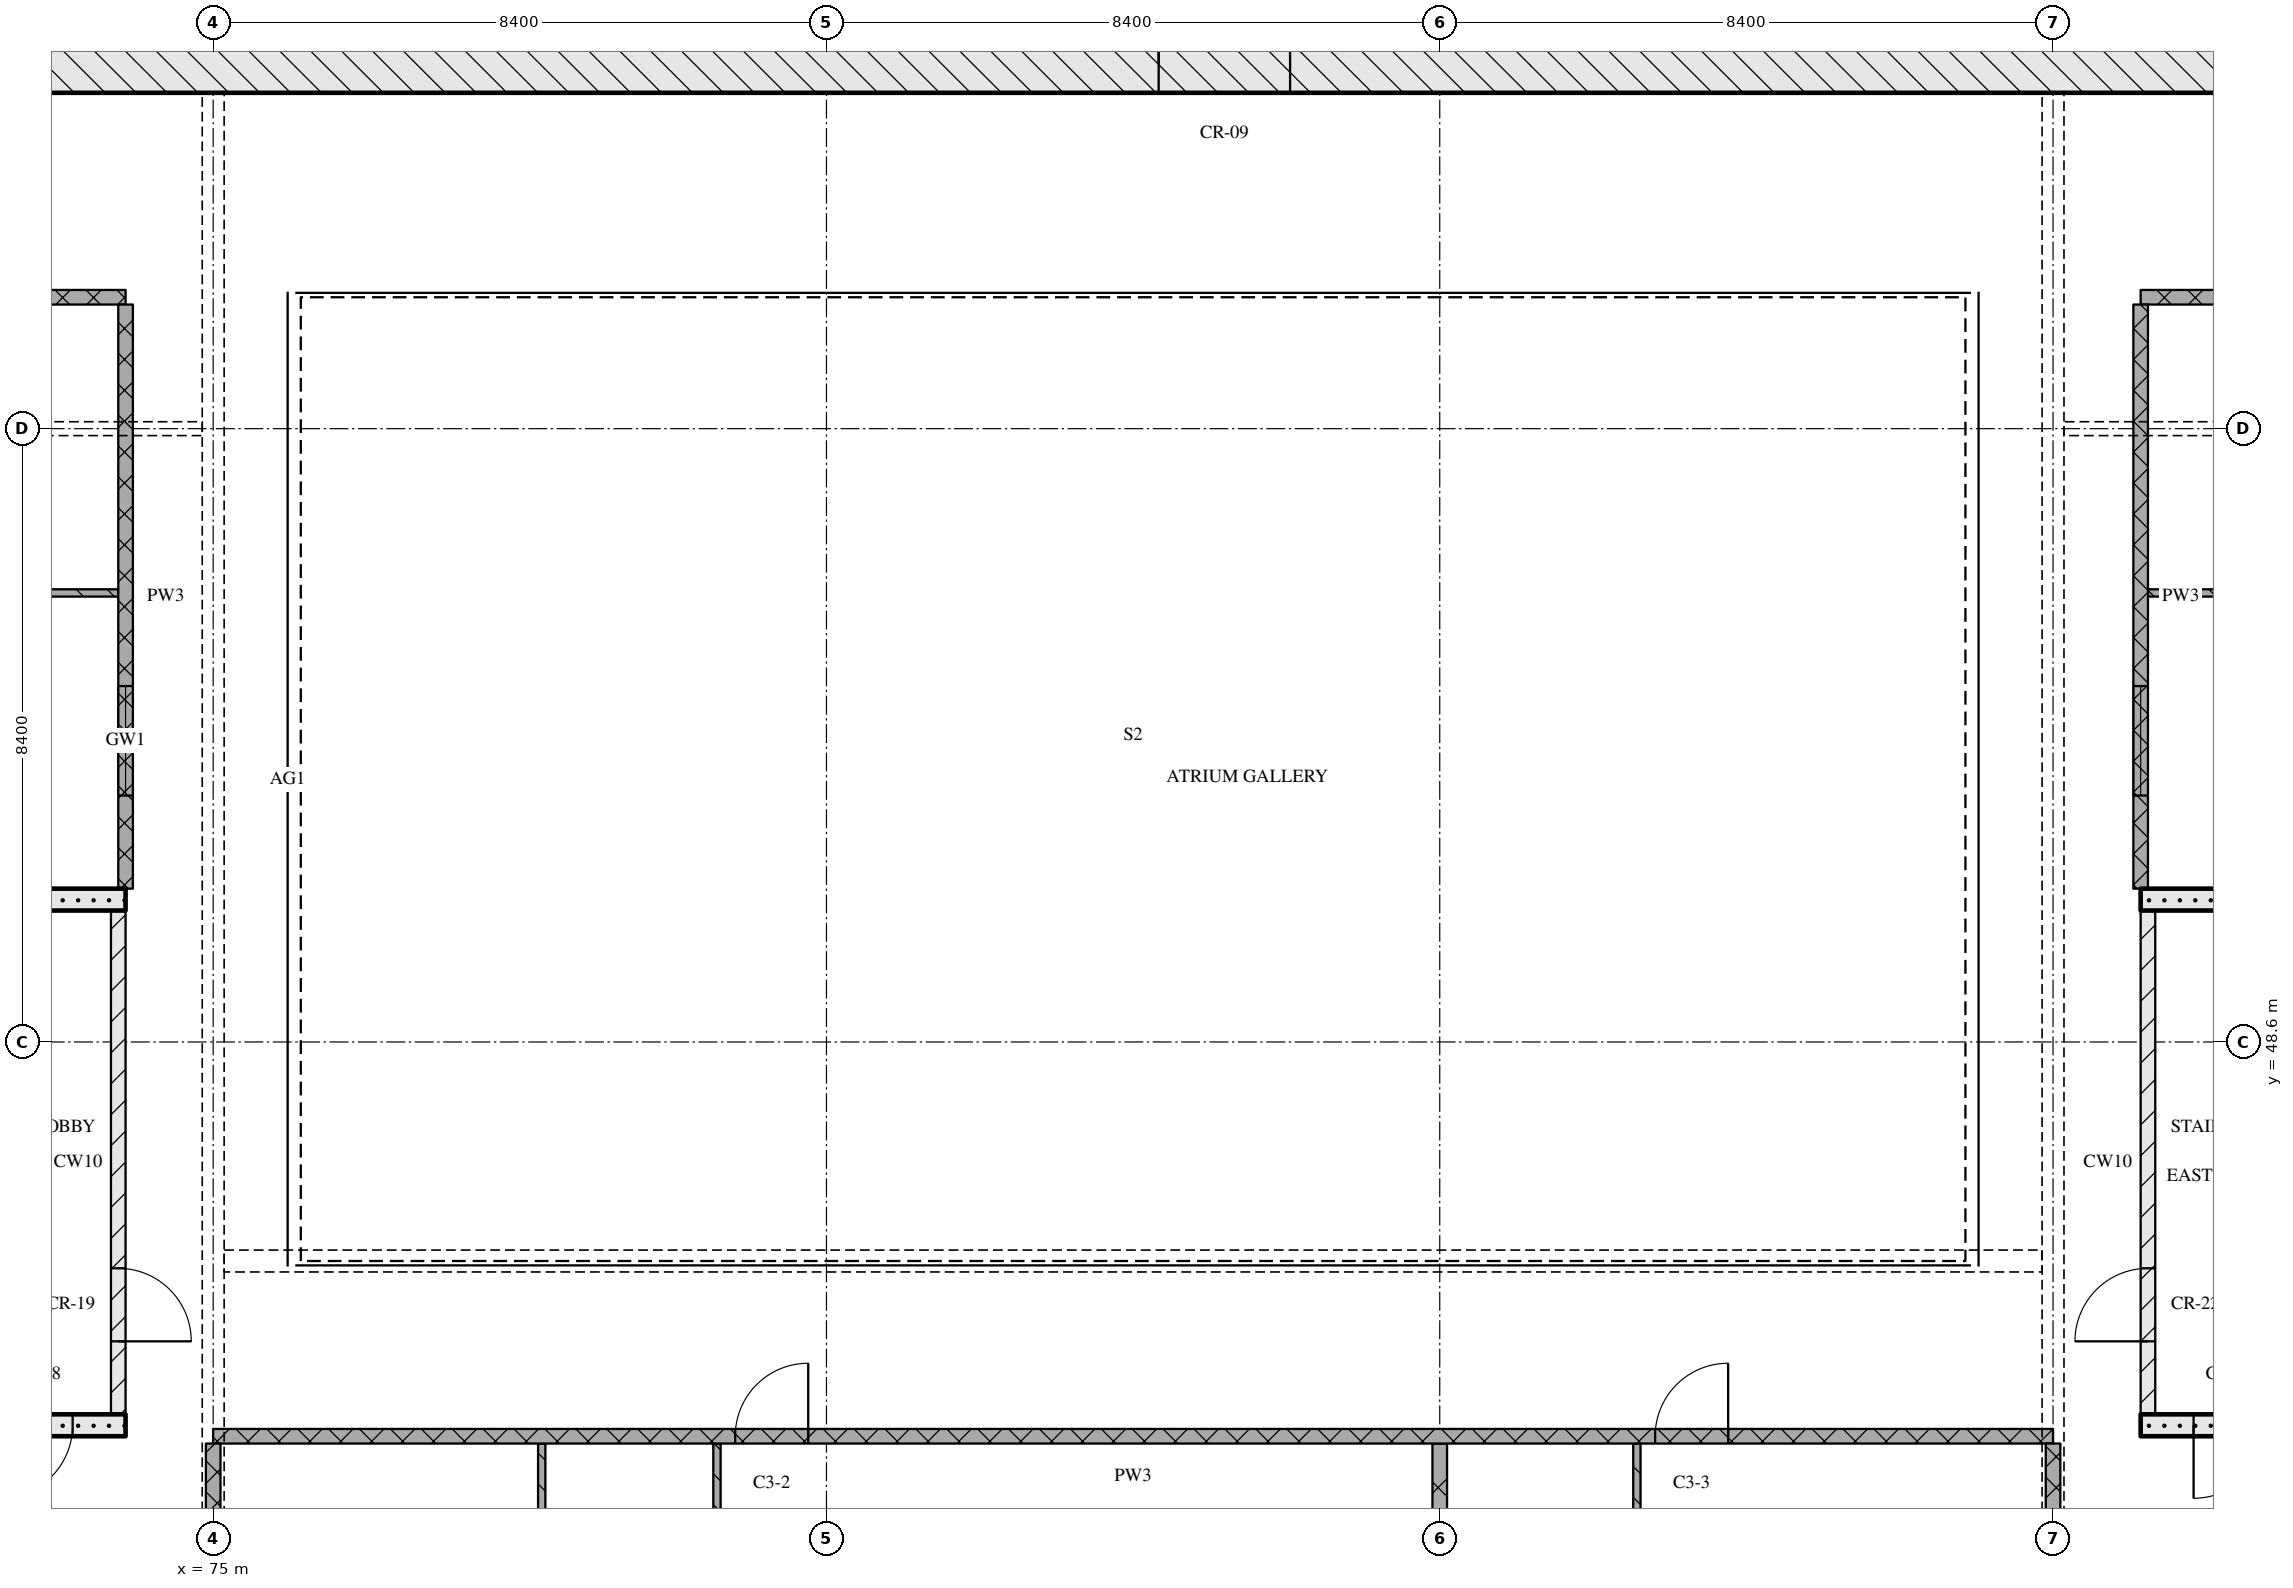
"""IFC4 building model, lengths in metres.
Left out: names, types, materials, properties, quantities, classifications, styles, units other than length and angle.
Written with IfcOpenShell. Run it as: python <this file> out.ifc"""

import sys

from ifc_helpers import new_model, si_unit, direction, frame, frame_2d, origin, place, context, subcontext, project, spatial, rectangle, extrude, element, fill, save


model = new_model("IFC4")
c1 = context("Model", 3, precision=1e-05, world=origin(), true_north=direction((0.0, 1.0)))
c2 = subcontext(c1, "Body", "Model", "MODEL_VIEW")
j1 = project(units=[si_unit("LENGTHUNIT", "METRE"), si_unit("PLANEANGLEUNIT", "RADIAN")], contexts=[c1])
p1 = place(None, origin())
s1 = spatial("IfcSite", under=j1, at=p1, CompositionType="ELEMENT")
p2 = place(p1, origin())
s2 = spatial("IfcBuilding", under=s1, at=p2, CompositionType="ELEMENT")
p3 = place(p2, frame((0.0, 0.0, 176.25)))
s3 = spatial("IfcBuildingStorey", under=s2, at=p3, CompositionType="ELEMENT", Elevation=176.25)
p4 = place(p3, frame((67.0, 62.0, 0.0), z_axis=(0.0, 0.0, 1.0), x_axis=(1.0, 0.0, 0.0)))
e1 = element("IfcWall", 1, at=p4, inside=s3, PredefinedType="SOLIDWALL", context=c2, shape_type="SweptSolid", body=[
    extrude(rectangle(XDim=41.2, YDim=0.8, at=frame_2d((20.6, 0.0))), origin(), (0.0, 0.0, 1.0), 3.32),
])
p5 = place(p4, frame((20.95, 0.0, 0.0)))
e2 = element("IfcOpeningElement", 2, at=p5, cuts=e1, PredefinedType="OPENING", context=c2, shape_type="SweptSolid", body=[
    extrude(rectangle(XDim=1.8, YDim=2.1, at=frame_2d((0.9, 1.05))), frame((0.0, 0.41, 0.0), z_axis=(0.0, -1.0, 0.0), x_axis=(1.0, 0.0, 0.0)), (0.0, 0.0, 1.0), 0.82),
])
p6 = place(p3, frame((68.2, 43.35, 0.0), z_axis=(0.0, 0.0, 1.0), x_axis=(1.0, 0.0, 0.0)))
e3 = element("IfcWall", 3, at=p6, inside=s3, PredefinedType="SOLIDWALL", context=c2, shape_type="SweptSolid", body=[
    extrude(rectangle(XDim=5.6, YDim=0.3, at=frame_2d((2.8, 0.0))), origin(), (0.0, 0.0, 1.0), 3.32),
])
p7 = place(p6, frame((3.875, 0.0, 0.0)))
e4 = element("IfcOpeningElement", 4, at=p7, cuts=e3, PredefinedType="OPENING", context=c2, shape_type="SweptSolid", body=[
    extrude(rectangle(XDim=1.0, YDim=2.1, at=frame_2d((0.5, 1.05))), frame((0.0, 0.16, 0.0), z_axis=(0.0, -1.0, 0.0), x_axis=(1.0, 0.0, 0.0)), (0.0, 0.0, 1.0), 0.32),
])
p8 = place(p3, frame((73.7, 43.5, 0.0), z_axis=(0.0, 0.0, 1.0), x_axis=(0.0, 1.0, 0.0)))
e5 = element("IfcWall", 5, at=p8, inside=s3, PredefinedType="PARTITIONING", context=c2, shape_type="SweptSolid", body=[
    extrude(rectangle(XDim=6.9, YDim=0.2, at=frame_2d((3.45, 0.0))), origin(), (0.0, 0.0, 1.0), 3.32),
])
p9 = place(p8, frame((1.0, 0.0, 0.0)))
e6 = element("IfcOpeningElement", 6, at=p9, cuts=e5, PredefinedType="OPENING", context=c2, shape_type="SweptSolid", body=[
    extrude(rectangle(XDim=1.0, YDim=2.1, at=frame_2d((0.5, 1.05))), frame((0.0, 0.11, 0.0), z_axis=(0.0, -1.0, 0.0), x_axis=(1.0, 0.0, 0.0)), (0.0, 0.0, 1.0), 0.22),
])
p10 = place(p3, frame((68.2, 50.55, 0.0), z_axis=(0.0, 0.0, 1.0), x_axis=(1.0, 0.0, 0.0)))
e7 = element("IfcWall", 7, at=p10, inside=s3, PredefinedType="SOLIDWALL", context=c2, shape_type="SweptSolid", body=[
    extrude(rectangle(XDim=5.6, YDim=0.3, at=frame_2d((2.8, 0.0))), origin(), (0.0, 0.0, 1.0), 3.32),
])
p11 = place(p3, frame((101.4, 43.35, 0.0), z_axis=(0.0, 0.0, 1.0), x_axis=(1.0, 0.0, 0.0)))
e8 = element("IfcWall", 8, at=p11, inside=s3, PredefinedType="SOLIDWALL", context=c2, shape_type="SweptSolid", body=[
    extrude(rectangle(XDim=5.6, YDim=0.3, at=frame_2d((2.8, 0.0))), origin(), (0.0, 0.0, 1.0), 3.32),
])
p12 = place(p11, frame((0.725, 0.0, 0.0)))
e9 = element("IfcOpeningElement", 9, at=p12, cuts=e8, PredefinedType="OPENING", context=c2, shape_type="SweptSolid", body=[
    extrude(rectangle(XDim=1.0, YDim=2.1, at=frame_2d((0.5, 1.05))), frame((0.0, 0.16, 0.0), z_axis=(0.0, -1.0, 0.0), x_axis=(1.0, 0.0, 0.0)), (0.0, 0.0, 1.0), 0.32),
])
p13 = place(p3, frame((101.5, 43.5, 0.0), z_axis=(0.0, 0.0, 1.0), x_axis=(0.0, 1.0, 0.0)))
e10 = element("IfcWall", 10, at=p13, inside=s3, PredefinedType="PARTITIONING", context=c2, shape_type="SweptSolid", body=[
    extrude(rectangle(XDim=6.9, YDim=0.2, at=frame_2d((3.45, 0.0))), origin(), (0.0, 0.0, 1.0), 3.32),
])
p14 = place(p13, frame((1.0, 0.0, 0.0)))
e11 = element("IfcOpeningElement", 11, at=p14, cuts=e10, PredefinedType="OPENING", context=c2, shape_type="SweptSolid", body=[
    extrude(rectangle(XDim=1.0, YDim=2.1, at=frame_2d((0.5, 1.05))), frame((0.0, 0.11, 0.0), z_axis=(0.0, -1.0, 0.0), x_axis=(1.0, 0.0, 0.0)), (0.0, 0.0, 1.0), 0.22),
])
p15 = place(p3, frame((101.4, 50.55, 0.0), z_axis=(0.0, 0.0, 1.0), x_axis=(1.0, 0.0, 0.0)))
e12 = element("IfcWall", 12, at=p15, inside=s3, PredefinedType="SOLIDWALL", context=c2, shape_type="SweptSolid", body=[
    extrude(rectangle(XDim=5.6, YDim=0.3, at=frame_2d((2.8, 0.0))), origin(), (0.0, 0.0, 1.0), 3.32),
])
p16 = place(p3, frame((100.2, 43.2, 0.0), z_axis=(0.0, 0.0, 1.0), x_axis=(-1.0, 0.0, 0.0)))
e13 = element("IfcWall", 13, at=p16, inside=s3, PredefinedType="PARTITIONING", context=c2, shape_type="SweptSolid", body=[
    extrude(rectangle(XDim=25.2, YDim=0.2, at=frame_2d((12.6, 0.0))), origin(), (0.0, 0.0, 1.0), 3.32),
])
p17 = place(p16, frame((4.45, 0.0, 0.0)))
e14 = element("IfcOpeningElement", 14, at=p17, cuts=e13, PredefinedType="OPENING", context=c2, shape_type="SweptSolid", body=[
    extrude(rectangle(XDim=1.0, YDim=2.1, at=frame_2d((0.5, 1.05))), frame((0.0, 0.11, 0.0), z_axis=(0.0, -1.0, 0.0), x_axis=(1.0, 0.0, 0.0)), (0.0, 0.0, 1.0), 0.22),
])
p18 = place(p16, frame((17.05, 0.0, 0.0)))
e15 = element("IfcOpeningElement", 15, at=p18, cuts=e13, PredefinedType="OPENING", context=c2, shape_type="SweptSolid", body=[
    extrude(rectangle(XDim=1.0, YDim=2.1, at=frame_2d((0.5, 1.05))), frame((0.0, 0.11, 0.0), z_axis=(0.0, -1.0, 0.0), x_axis=(1.0, 0.0, 0.0)), (0.0, 0.0, 1.0), 0.22),
])
p19 = place(p3, frame((73.7, 54.75, 0.0), z_axis=(0.0, 0.0, 1.0), x_axis=(-1.0, 0.0, 0.0)))
e16 = element("IfcWall", 16, at=p19, inside=s3, PredefinedType="PARTITIONING", context=c2, shape_type="SweptSolid", body=[
    extrude(rectangle(XDim=5.3, YDim=0.1, at=frame_2d((2.65, 0.0))), origin(), (0.0, 0.0, 1.0), 3.32),
])
p20 = place(p19, frame((2.15, 0.0, 0.0)))
e17 = element("IfcOpeningElement", 17, at=p20, cuts=e16, PredefinedType="OPENING", context=c2, shape_type="SweptSolid", body=[
    extrude(rectangle(XDim=0.9, YDim=2.1, at=frame_2d((0.45, 1.05))), frame((0.0, 0.06, 0.0), z_axis=(0.0, -1.0, 0.0), x_axis=(1.0, 0.0, 0.0)), (0.0, 0.0, 1.0), 0.12),
])
p21 = place(p3, frame((101.5, 54.75, 0.0), z_axis=(0.0, 0.0, 1.0), x_axis=(1.0, 0.0, 0.0)))
e18 = element("IfcWall", 18, at=p21, inside=s3, PredefinedType="PARTITIONING", context=c2, shape_type="SweptSolid", body=[
    extrude(rectangle(XDim=6.2, YDim=0.1, at=frame_2d((3.1, 0.0))), origin(), (0.0, 0.0, 1.0), 3.32),
])
p22 = place(p3, frame((63.0, 58.8, 0.0), z_axis=(0.0, 0.0, 1.0), x_axis=(1.0, 0.0, 0.0)))
e19 = element("IfcWall", 19, at=p22, inside=s3, PredefinedType="PARTITIONING", context=c2, shape_type="SweptSolid", body=[
    extrude(rectangle(XDim=10.8, YDim=0.2, at=frame_2d((5.4, 0.0))), origin(), (0.0, 0.0, 1.0), 3.32),
])
p23 = place(p3, frame((112.2, 58.8, 0.0), z_axis=(0.0, 0.0, 1.0), x_axis=(-1.0, 0.0, 0.0)))
e20 = element("IfcWall", 20, at=p23, inside=s3, PredefinedType="PARTITIONING", context=c2, shape_type="SweptSolid", body=[
    extrude(rectangle(XDim=10.8, YDim=0.2, at=frame_2d((5.4, 0.0))), origin(), (0.0, 0.0, 1.0), 3.32),
])
p24 = place(p23, frame((2.85, 0.0, 0.0)))
e21 = element("IfcOpeningElement", 21, at=p24, cuts=e20, PredefinedType="OPENING", context=c2, shape_type="SweptSolid", body=[
    extrude(rectangle(XDim=1.0, YDim=2.1, at=frame_2d((0.5, 1.05))), frame((0.0, 0.11, 0.0), z_axis=(0.0, -1.0, 0.0), x_axis=(1.0, 0.0, 0.0)), (0.0, 0.0, 1.0), 0.22),
])
p25 = place(p3, frame((73.8, 58.7, 0.0), z_axis=(0.0, 0.0, 1.0), x_axis=(0.0, -1.0, 0.0)))
e22 = element("IfcWall", 22, at=p25, inside=s3, PredefinedType="PARTITIONING", context=c2, shape_type="SweptSolid", body=[
    extrude(rectangle(XDim=8.0, YDim=0.2, at=frame_2d((4.0, 0.0))), origin(), (0.0, 0.0, 1.0), 3.32),
])
p26 = place(p25, frame((5.225, 0.0, 0.9)))
e23 = element("IfcOpeningElement", 23, at=p26, cuts=e22, PredefinedType="OPENING", context=c2, shape_type="SweptSolid", body=[
    extrude(rectangle(XDim=1.5, YDim=1.5, at=frame_2d((0.75, 0.75))), frame((0.0, 0.11, 0.0), z_axis=(0.0, -1.0, 0.0), x_axis=(1.0, 0.0, 0.0)), (0.0, 0.0, 1.0), 0.22),
])
p27 = place(p3, frame((75.0, 43.1, 0.0), z_axis=(0.0, 0.0, 1.0), x_axis=(0.0, -1.0, 0.0)))
e24 = element("IfcWall", 24, at=p27, inside=s3, PredefinedType="PARTITIONING", context=c2, shape_type="SweptSolid", body=[
    extrude(rectangle(XDim=2.2, YDim=0.2, at=frame_2d((1.1, 0.0))), origin(), (0.0, 0.0, 1.0), 2.43),
])
for number, where, z_axis, x_axis in (
    (25, (79.5, 43.1, 0.0), (0.0, 0.0, 1.0), (0.0, -1.0, 0.0)),
    (26, (81.9, 43.1, 0.0), (0.0, 0.0, 1.0), (0.0, -1.0, 0.0)),
):
    element("IfcWall", number, at=place(p3, frame(where, z_axis=z_axis, x_axis=x_axis)), inside=s3, PredefinedType="PARTITIONING", context=c2, shape_type="SweptSolid", body=[
        extrude(rectangle(XDim=4.35, YDim=0.1, at=frame_2d((2.175, 0.0))), origin(), (0.0, 0.0, 1.0), 3.32),
    ])
p28 = place(p3, frame((91.8, 43.1, 0.0), z_axis=(0.0, 0.0, 1.0), x_axis=(0.0, -1.0, 0.0)))
e27 = element("IfcWall", 27, at=p28, inside=s3, PredefinedType="PARTITIONING", context=c2, shape_type="SweptSolid", body=[
    extrude(rectangle(XDim=2.53, YDim=0.2, at=frame_2d((1.265, 0.0))), origin(), (0.0, 0.0, 1.0), 3.32),
])
p29 = place(p3, frame((94.5, 43.1, 0.0), z_axis=(0.0, 0.0, 1.0), x_axis=(0.0, -1.0, 0.0)))
e28 = element("IfcWall", 28, at=p29, inside=s3, PredefinedType="PARTITIONING", context=c2, shape_type="SweptSolid", body=[
    extrude(rectangle(XDim=3.75, YDim=0.1, at=frame_2d((1.875, 0.0))), origin(), (0.0, 0.0, 1.0), 3.32),
])
p30 = place(p3, frame((100.2, 43.1, 0.0), z_axis=(0.0, 0.0, 1.0), x_axis=(0.0, -1.0, 0.0)))
e29 = element("IfcWall", 29, at=p30, inside=s3, PredefinedType="PARTITIONING", context=c2, shape_type="SweptSolid", body=[
    extrude(rectangle(XDim=2.2, YDim=0.2, at=frame_2d((1.1, 0.0))), origin(), (0.0, 0.0, 1.0), 2.43),
])
p31 = place(p3, frame((101.4, 58.7, 0.0), z_axis=(0.0, 0.0, 1.0), x_axis=(0.0, -1.0, 0.0)))
e30 = element("IfcWall", 30, at=p31, inside=s3, PredefinedType="PARTITIONING", context=c2, shape_type="SweptSolid", body=[
    extrude(rectangle(XDim=8.0, YDim=0.2, at=frame_2d((4.0, 0.0))), origin(), (0.0, 0.0, 1.0), 3.32),
])
p32 = place(p31, frame((5.225, 0.0, 0.9)))
e31 = element("IfcOpeningElement", 31, at=p32, cuts=e30, PredefinedType="OPENING", context=c2, shape_type="SweptSolid", body=[
    extrude(rectangle(XDim=1.5, YDim=1.5, at=frame_2d((0.75, 0.75))), frame((0.0, 0.11, 0.0), z_axis=(0.0, -1.0, 0.0), x_axis=(1.0, 0.0, 0.0)), (0.0, 0.0, 1.0), 0.22),
])
p33 = place(p5, origin())
e32 = element("IfcDoor", 32, at=p33, inside=s3, OperationType="DOUBLE_DOOR_SINGLE_SWING", PredefinedType="DOOR", context=c2, shape_type="SweptSolid", body=[
    extrude(rectangle(XDim=1.8, YDim=2.1, at=frame_2d((0.9, 1.05))), frame((0.0, 0.025, 0.0), z_axis=(0.0, -1.0, 0.0), x_axis=(1.0, 0.0, 0.0)), (0.0, 0.0, 1.0), 0.05),
])
fill(e2, e32)
p34 = place(p7, origin())
e33 = element("IfcDoor", 33, at=p34, inside=s3, OperationType="SINGLE_SWING_RIGHT", PredefinedType="DOOR", context=c2, shape_type="SweptSolid", body=[
    extrude(rectangle(XDim=1.0, YDim=2.1, at=frame_2d((0.5, 1.05))), frame((0.0, 0.025, 0.0), z_axis=(0.0, -1.0, 0.0), x_axis=(1.0, 0.0, 0.0)), (0.0, 0.0, 1.0), 0.05),
])
fill(e4, e33)
p35 = place(p9, origin())
e34 = element("IfcDoor", 34, at=p35, inside=s3, OperationType="SINGLE_SWING_RIGHT", PredefinedType="DOOR", context=c2, shape_type="SweptSolid", body=[
    extrude(rectangle(XDim=1.0, YDim=2.1, at=frame_2d((0.5, 1.05))), frame((0.0, 0.025, 0.0), z_axis=(0.0, -1.0, 0.0), x_axis=(1.0, 0.0, 0.0)), (0.0, 0.0, 1.0), 0.05),
])
fill(e6, e34)
p36 = place(p12, origin())
e35 = element("IfcDoor", 35, at=p36, inside=s3, OperationType="SINGLE_SWING_RIGHT", PredefinedType="DOOR", context=c2, shape_type="SweptSolid", body=[
    extrude(rectangle(XDim=1.0, YDim=2.1, at=frame_2d((0.5, 1.05))), frame((0.0, 0.025, 0.0), z_axis=(0.0, -1.0, 0.0), x_axis=(1.0, 0.0, 0.0)), (0.0, 0.0, 1.0), 0.05),
])
fill(e9, e35)
p37 = place(p14, origin())
e36 = element("IfcDoor", 36, at=p37, inside=s3, OperationType="SINGLE_SWING_LEFT", PredefinedType="DOOR", context=c2, shape_type="SweptSolid", body=[
    extrude(rectangle(XDim=1.0, YDim=2.1, at=frame_2d((0.5, 1.05))), frame((0.0, 0.025, 0.0), z_axis=(0.0, -1.0, 0.0), x_axis=(1.0, 0.0, 0.0)), (0.0, 0.0, 1.0), 0.05),
])
fill(e11, e36)
p38 = place(p17, origin())
e37 = element("IfcDoor", 37, at=p38, inside=s3, OperationType="SINGLE_SWING_RIGHT", PredefinedType="DOOR", context=c2, shape_type="SweptSolid", body=[
    extrude(rectangle(XDim=1.0, YDim=2.1, at=frame_2d((0.5, 1.05))), frame((0.0, 0.025, 0.0), z_axis=(0.0, -1.0, 0.0), x_axis=(1.0, 0.0, 0.0)), (0.0, 0.0, 1.0), 0.05),
])
fill(e14, e37)
p39 = place(p18, origin())
e38 = element("IfcDoor", 38, at=p39, inside=s3, OperationType="SINGLE_SWING_RIGHT", PredefinedType="DOOR", context=c2, shape_type="SweptSolid", body=[
    extrude(rectangle(XDim=1.0, YDim=2.1, at=frame_2d((0.5, 1.05))), frame((0.0, 0.025, 0.0), z_axis=(0.0, -1.0, 0.0), x_axis=(1.0, 0.0, 0.0)), (0.0, 0.0, 1.0), 0.05),
])
fill(e15, e38)
p40 = place(p26, origin())
e39 = element("IfcWindow", 39, at=p40, inside=s3, PartitioningType="SINGLE_PANEL", PredefinedType="WINDOW", context=c2, shape_type="SweptSolid", body=[
    extrude(rectangle(XDim=1.5, YDim=1.5, at=frame_2d((0.75, 0.75))), frame((0.0, 0.03, 0.0), z_axis=(0.0, -1.0, 0.0), x_axis=(1.0, 0.0, 0.0)), (0.0, 0.0, 1.0), 0.06),
])
fill(e23, e39)
p41 = place(p32, origin())
e40 = element("IfcWindow", 40, at=p41, inside=s3, PartitioningType="SINGLE_PANEL", PredefinedType="WINDOW", context=c2, shape_type="SweptSolid", body=[
    extrude(rectangle(XDim=1.5, YDim=1.5, at=frame_2d((0.75, 0.75))), frame((0.0, 0.03, 0.0), z_axis=(0.0, -1.0, 0.0), x_axis=(1.0, 0.0, 0.0)), (0.0, 0.0, 1.0), 0.06),
])
fill(e31, e40)
save(model, sys.argv[1])
